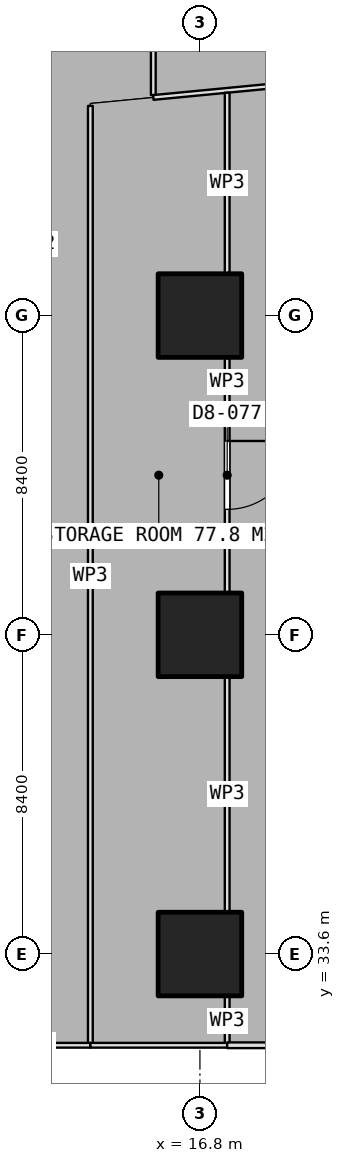
"""IFC4 building model, lengths in metres.
Left out: names, types, materials, properties, quantities, classifications, styles, units other than length and angle.
Written with IfcOpenShell. Run it as: python <this file> out.ifc"""

import sys

from ifc_helpers import new_model, si_unit, direction, frame, frame_2d, origin, origin_2d, place, context, subcontext, project, spatial, rectangle, extrude, element, fill, save


model = new_model("IFC4")
c1 = context("Model", 3, precision=1e-05, world=origin(), true_north=direction((0.0, 1.0)))
c2 = subcontext(c1, "Body", "Model", "MODEL_VIEW")
j1 = project(units=[si_unit("LENGTHUNIT", "METRE"), si_unit("PLANEANGLEUNIT", "RADIAN")], contexts=[c1])
p1 = place(None, origin())
s1 = spatial("IfcSite", under=j1, at=p1, CompositionType="ELEMENT")
p2 = place(p1, origin())
s2 = spatial("IfcBuilding", under=s1, at=p2, CompositionType="ELEMENT")
p3 = place(p2, frame((0.0, 0.0, 59.15)))
s3 = spatial("IfcBuildingStorey", under=s2, at=p3, CompositionType="ELEMENT", Elevation=59.15)
for number, where, z_axis, x_axis in (
    (1, (16.8, 33.6, 0.0), (0.0, 0.0, 1.0), (1.0, 0.0, 0.0)),
    (2, (16.8, 42.0, 0.0), (0.0, 0.0, 1.0), (1.0, 0.0, 0.0)),
    (3, (16.8, 50.4, 0.0), (0.0, 0.0, 1.0), (1.0, 0.0, 0.0)),
):
    element("IfcColumn", number, at=place(p3, frame(where, z_axis=z_axis, x_axis=x_axis)), inside=s3, PredefinedType="COLUMN", context=c2, shape_type="SweptSolid", body=[
        extrude(rectangle(XDim=2.2, YDim=2.2, at=origin_2d()), origin(), (0.0, 0.0, 1.0), 3.75),
    ])
p4 = place(p3, frame((15.573, 56.202, 0.0), z_axis=(0.0, 0.0, 1.0), x_axis=(0.0, 1.0, 0.0)))
e4 = element("IfcWall", 4, at=p4, inside=s3, PredefinedType="PARTITIONING", context=c2, shape_type="SweptSolid", body=[
    extrude(rectangle(XDim=4.98, YDim=0.125, at=frame_2d((2.49, 0.0))), origin(), (0.0, 0.0, 1.0), 3.5),
])
p5 = place(p3, frame((25.466, 57.09, 0.0), z_axis=(0.0, 0.0, 1.0), x_axis=(-0.995409839186, -0.09570398138, 0.0)))
e5 = element("IfcWall", 5, at=p5, inside=s3, PredefinedType="PARTITIONING", context=c2, shape_type="SweptSolid", body=[
    extrude(rectangle(XDim=9.939, YDim=0.125, at=frame_2d((4.969, 0.0))), origin(), (0.0, 0.0, 1.0), 3.5),
])
p6 = place(p5, frame((4.469, 0.0, 0.0)))
e6 = element("IfcOpeningElement", 6, at=p6, cuts=e5, PredefinedType="OPENING", context=c2, shape_type="SweptSolid", body=[
    extrude(rectangle(XDim=1.0, YDim=2.1, at=frame_2d((0.5, 1.05))), frame((0.0, 0.073, 0.0), z_axis=(0.0, -1.0, 0.0), x_axis=(1.0, 0.0, 0.0)), (0.0, 0.0, 1.0), 0.145),
])
p7 = place(p3, frame((13.917, 55.917, 0.0), z_axis=(0.0, 0.0, 1.0), x_axis=(0.0, -1.0, 0.0)))
e7 = element("IfcWall", 7, at=p7, inside=s3, PredefinedType="PARTITIONING", context=c2, shape_type="SweptSolid", body=[
    extrude(rectangle(XDim=24.717, YDim=0.125, at=frame_2d((12.358, 0.0))), origin(), (0.0, 0.0, 1.0), 3.5),
])
p8 = place(p3, frame((13.917, 31.2, 0.0), z_axis=(0.0, 0.0, 1.0), x_axis=(-1.0, 0.0, 0.0)))
e8 = element("IfcWall", 8, at=p8, inside=s3, PredefinedType="PARTITIONING", context=c2, shape_type="SweptSolid", body=[
    extrude(rectangle(XDim=7.282, YDim=0.125, at=frame_2d((3.641, 0.0))), origin(), (0.0, 0.0, 1.0), 3.5),
])
p9 = place(p8, frame((2.726, 0.0, 0.0)))
e9 = element("IfcOpeningElement", 9, at=p9, cuts=e8, PredefinedType="OPENING", context=c2, shape_type="SweptSolid", body=[
    extrude(rectangle(XDim=1.8, YDim=2.1, at=frame_2d((0.9, 1.05))), frame((0.0, 0.073, 0.0), z_axis=(0.0, -1.0, 0.0), x_axis=(1.0, 0.0, 0.0)), (0.0, 0.0, 1.0), 0.145),
])
p10 = place(p3, frame((17.517, 56.263, 0.0), z_axis=(0.0, 0.0, 1.0), x_axis=(0.0, -1.0, 0.0)))
e10 = element("IfcWall", 10, at=p10, inside=s3, PredefinedType="PARTITIONING", context=c2, shape_type="SweptSolid", body=[
    extrude(rectangle(XDim=4.743, YDim=0.125, at=frame_2d((2.372, 0.0))), origin(), (0.0, 0.0, 1.0), 3.5),
])
p11 = place(p3, frame((17.517, 49.28, 0.0), z_axis=(0.0, 0.0, 1.0), x_axis=(0.0, -1.0, 0.0)))
e11 = element("IfcWall", 11, at=p11, inside=s3, PredefinedType="PARTITIONING", context=c2, shape_type="SweptSolid", body=[
    extrude(rectangle(XDim=6.16, YDim=0.125, at=frame_2d((3.08, 0.0))), origin(), (0.0, 0.0, 1.0), 3.5),
])
p12 = place(p11, frame((2.18, 0.0, 0.0)))
e12 = element("IfcOpeningElement", 12, at=p12, cuts=e11, PredefinedType="OPENING", context=c2, shape_type="SweptSolid", body=[
    extrude(rectangle(XDim=1.8, YDim=2.1, at=frame_2d((0.9, 1.05))), frame((0.0, 0.073, 0.0), z_axis=(0.0, -1.0, 0.0), x_axis=(1.0, 0.0, 0.0)), (0.0, 0.0, 1.0), 0.145),
])
p13 = place(p3, frame((17.517, 40.88, 0.0), z_axis=(0.0, 0.0, 1.0), x_axis=(0.0, -1.0, 0.0)))
e13 = element("IfcWall", 13, at=p13, inside=s3, PredefinedType="PARTITIONING", context=c2, shape_type="SweptSolid", body=[
    extrude(rectangle(XDim=6.16, YDim=0.125, at=frame_2d((3.08, 0.0))), origin(), (0.0, 0.0, 1.0), 3.5),
])
p14 = place(p3, frame((17.517, 32.48, 0.0), z_axis=(0.0, 0.0, 1.0), x_axis=(0.0, -1.0, 0.0)))
e14 = element("IfcWall", 14, at=p14, inside=s3, PredefinedType="PARTITIONING", context=c2, shape_type="SweptSolid", body=[
    extrude(rectangle(XDim=1.28, YDim=0.125, at=frame_2d((0.64, 0.0))), origin(), (0.0, 0.0, 1.0), 3.5),
])
p15 = place(p3, frame((17.517, 31.2, 0.0), z_axis=(0.0, 0.0, 1.0), x_axis=(-1.0, 0.0, 0.0)))
e15 = element("IfcWall", 15, at=p15, inside=s3, PredefinedType="PARTITIONING", context=c2, shape_type="SweptSolid", body=[
    extrude(rectangle(XDim=3.6, YDim=0.125, at=frame_2d((1.8, 0.0))), origin(), (0.0, 0.0, 1.0), 3.5),
])
p16 = place(p3, frame((22.4, 31.2, 0.0), z_axis=(0.0, 0.0, 1.0), x_axis=(-1.0, 0.0, 0.0)))
e16 = element("IfcWall", 16, at=p16, inside=s3, PredefinedType="PARTITIONING", context=c2, shape_type="SweptSolid", body=[
    extrude(rectangle(XDim=4.883, YDim=0.15, at=frame_2d((2.441, 0.0))), origin(), (0.0, 0.0, 1.0), 3.5),
])
p17 = place(p12, origin())
e17 = element("IfcDoor", 17, at=p17, inside=s3, OperationType="DOUBLE_DOOR_SINGLE_SWING", PredefinedType="DOOR", context=c2, shape_type="SweptSolid", body=[
    extrude(rectangle(XDim=1.8, YDim=2.1, at=frame_2d((0.9, 1.05))), frame((0.0, 0.025, 0.0), z_axis=(0.0, -1.0, 0.0), x_axis=(1.0, 0.0, 0.0)), (0.0, 0.0, 1.0), 0.05),
])
fill(e12, e17)
save(model, sys.argv[1])
